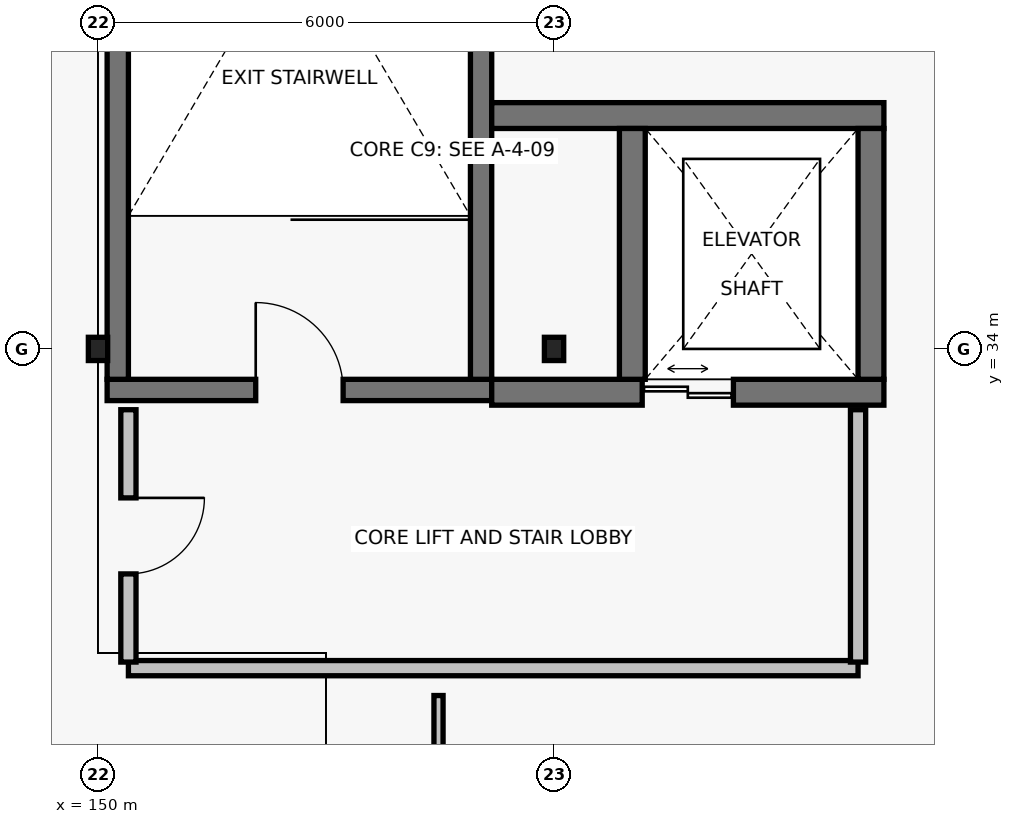
"""IFC4 building model, lengths in metres.
Left out: names, types, materials, properties, quantities, classifications, styles, units other than length and angle.
Written with IfcOpenShell. Run it as: python <this file> out.ifc"""

import sys

from ifc_helpers import new_model, si_unit, direction, frame, frame_2d, origin, origin_2d, place, context, subcontext, project, spatial, rectangle, i_section, extrude, element, fill, save


model = new_model("IFC4")
c1 = context("Model", 3, precision=1e-05, world=origin(), true_north=direction((0.0, 1.0)))
c2 = subcontext(c1, "Body", "Model", "MODEL_VIEW")
j1 = project(units=[si_unit("LENGTHUNIT", "METRE"), si_unit("PLANEANGLEUNIT", "RADIAN")], contexts=[c1])
p1 = place(None, origin())
s1 = spatial("IfcSite", under=j1, at=p1, CompositionType="ELEMENT")
p2 = place(p1, origin())
s2 = spatial("IfcBuilding", under=s1, at=p2, CompositionType="ELEMENT")
p3 = place(p2, frame((0.0, 0.0, 11.4)))
s3 = spatial("IfcBuildingStorey", under=s2, at=p3, CompositionType="ELEMENT", Elevation=11.4)
for number, where, z_axis, x_axis in (
    (1, (150.0, 34.0, 0.0), (0.0, 0.0, 1.0), (1.0, 0.0, 0.0)),
    (2, (156.0, 34.0, 0.0), (0.0, 0.0, 1.0), (1.0, 0.0, 0.0)),
):
    element("IfcColumn", number, at=place(p3, frame(where, z_axis=z_axis, x_axis=x_axis)), inside=s3, PredefinedType="COLUMN", context=c2, shape_type="SweptSolid", body=[
        extrude(i_section(OverallWidth=0.254, OverallDepth=0.306, WebThickness=0.009, FlangeThickness=0.015, FilletRadius=0.013, at=origin_2d()), origin(), (0.0, 0.0, 1.0), 4.0),
    ])
p4 = place(p3, frame((150.12, 33.46, 0.0), z_axis=(0.0, 0.0, 1.0), x_axis=(1.0, 0.0, 0.0)))
e3 = element("IfcWall", 3, at=p4, inside=s3, PredefinedType="SHEAR", context=c2, shape_type="SweptSolid", body=[
    extrude(rectangle(XDim=5.06, YDim=0.28, at=frame_2d((2.53, 0.0))), origin(), (0.0, 0.0, 1.0), 3.76),
])
p5 = place(p4, frame((1.955, 0.0, 0.0)))
e4 = element("IfcOpeningElement", 4, at=p5, cuts=e3, PredefinedType="OPENING", context=c2, shape_type="SweptSolid", body=[
    extrude(rectangle(XDim=1.15, YDim=2.15, at=frame_2d((0.575, 1.075))), frame((0.0, 0.155, 0.0), z_axis=(0.0, -1.0, 0.0), x_axis=(1.0, 0.0, 0.0)), (0.0, 0.0, 1.0), 0.31),
])
for number, where, z_axis, x_axis in (
    (5, (150.26, 43.4, 0.0), (0.0, 0.0, 1.0), (0.0, -1.0, 0.0)),
    (6, (155.04, 33.6, 0.0), (0.0, 0.0, 1.0), (0.0, 1.0, 0.0)),
):
    element("IfcWall", number, at=place(p3, frame(where, z_axis=z_axis, x_axis=x_axis)), inside=s3, PredefinedType="SHEAR", context=c2, shape_type="SweptSolid", body=[
        extrude(rectangle(XDim=9.8, YDim=0.28, at=frame_2d((4.9, 0.0))), origin(), (0.0, 0.0, 1.0), 3.76),
    ])
p6 = place(p3, frame((155.18, 33.43, 0.0), z_axis=(0.0, 0.0, 1.0), x_axis=(1.0, 0.0, 0.0)))
e7 = element("IfcWall", 7, at=p6, inside=s3, PredefinedType="SHEAR", context=c2, shape_type="SweptSolid", body=[
    extrude(rectangle(XDim=5.16, YDim=0.34, at=frame_2d((2.58, 0.0))), origin(), (0.0, 0.0, 1.0), 3.76),
])
p7 = place(p6, frame((1.98, 0.0, 0.0)))
e8 = element("IfcOpeningElement", 8, at=p7, cuts=e7, PredefinedType="OPENING", context=c2, shape_type="SweptSolid", body=[
    extrude(rectangle(XDim=1.2, YDim=2.2, at=frame_2d((0.6, 1.1))), frame((0.0, 0.185, 0.0), z_axis=(0.0, -1.0, 0.0), x_axis=(1.0, 0.0, 0.0)), (0.0, 0.0, 1.0), 0.37),
])
p8 = place(p3, frame((160.34, 37.07, 0.0), z_axis=(0.0, 0.0, 1.0), x_axis=(-1.0, 0.0, 0.0)))
e9 = element("IfcWall", 9, at=p8, inside=s3, PredefinedType="SHEAR", context=c2, shape_type="SweptSolid", body=[
    extrude(rectangle(XDim=5.16, YDim=0.34, at=frame_2d((2.58, 0.0))), origin(), (0.0, 0.0, 1.0), 3.76),
])
for number, where, z_axis, x_axis in (
    (10, (157.03, 36.9, 0.0), (0.0, 0.0, 1.0), (0.0, -1.0, 0.0)),
    (11, (160.17, 33.6, 0.0), (0.0, 0.0, 1.0), (0.0, 1.0, 0.0)),
):
    element("IfcWall", number, at=place(p3, frame(where, z_axis=z_axis, x_axis=x_axis)), inside=s3, PredefinedType="SHEAR", context=c2, shape_type="SweptSolid", body=[
        extrude(rectangle(XDim=3.3, YDim=0.34, at=frame_2d((1.65, 0.0))), origin(), (0.0, 0.0, 1.0), 3.76),
    ])
p9 = place(p3, frame((150.4, 29.8, 0.0), z_axis=(0.0, 0.0, 1.0), x_axis=(1.0, 0.0, 0.0)))
e12 = element("IfcWall", 12, at=p9, inside=s3, PredefinedType="PARTITIONING", context=c2, shape_type="SweptSolid", body=[
    extrude(rectangle(XDim=9.6, YDim=0.2, at=frame_2d((4.8, 0.0))), origin(), (0.0, 0.0, 1.0), 3.187),
])
p10 = place(p3, frame((150.4, 33.2, 0.0), z_axis=(0.0, 0.0, 1.0), x_axis=(0.0, -1.0, 0.0)))
e13 = element("IfcWall", 13, at=p10, inside=s3, PredefinedType="PARTITIONING", context=c2, shape_type="SweptSolid", body=[
    extrude(rectangle(XDim=3.32, YDim=0.2, at=frame_2d((1.66, 0.0))), origin(), (0.0, 0.0, 1.0), 3.296),
])
p11 = place(p10, frame((1.16, 0.0, 0.0)))
e14 = element("IfcOpeningElement", 14, at=p11, cuts=e13, PredefinedType="OPENING", context=c2, shape_type="SweptSolid", body=[
    extrude(rectangle(XDim=1.0, YDim=2.15, at=frame_2d((0.5, 1.075))), frame((0.0, 0.115, 0.0), z_axis=(0.0, -1.0, 0.0), x_axis=(1.0, 0.0, 0.0)), (0.0, 0.0, 1.0), 0.23),
])
p12 = place(p3, frame((160.0, 29.88, 0.0), z_axis=(0.0, 0.0, 1.0), x_axis=(0.0, 1.0, 0.0)))
e15 = element("IfcWall", 15, at=p12, inside=s3, PredefinedType="PARTITIONING", context=c2, shape_type="SweptSolid", body=[
    extrude(rectangle(XDim=3.32, YDim=0.2, at=frame_2d((1.66, 0.0))), origin(), (0.0, 0.0, 1.0), 3.68),
])
p13 = place(p3, frame((154.48, 12.48, 0.0), z_axis=(0.0, 0.0, 1.0), x_axis=(0.0, 1.0, 0.0)))
e16 = element("IfcWall", 16, at=p13, inside=s3, PredefinedType="PARTITIONING", context=c2, shape_type="SweptSolid", body=[
    extrude(rectangle(XDim=16.96, YDim=0.12, at=frame_2d((8.48, 0.0))), origin(), (0.0, 0.0, 1.0), 3.187),
])
p14 = place(p13, frame((7.84, 0.0, 0.0)))
e17 = element("IfcOpeningElement", 17, at=p14, cuts=e16, PredefinedType="OPENING", context=c2, shape_type="SweptSolid", body=[
    extrude(rectangle(XDim=1.28, YDim=2.2, at=frame_2d((0.64, 1.1))), frame((0.0, 0.075, 0.0), z_axis=(0.0, -1.0, 0.0), x_axis=(1.0, 0.0, 0.0)), (0.0, 0.0, 1.0), 0.15),
])
p15 = place(p5, origin())
e18 = element("IfcDoor", 18, at=p15, inside=s3, OperationType="SINGLE_SWING_LEFT", PredefinedType="DOOR", context=c2, shape_type="SweptSolid", body=[
    extrude(rectangle(XDim=1.15, YDim=2.15, at=frame_2d((0.575, 1.075))), frame((0.0, 0.025, 0.0), z_axis=(0.0, -1.0, 0.0), x_axis=(1.0, 0.0, 0.0)), (0.0, 0.0, 1.0), 0.05),
])
fill(e4, e18)
p16 = place(p7, origin())
e19 = element("IfcDoor", 19, at=p16, inside=s3, OperationType="DOUBLE_DOOR_SLIDING", PredefinedType="DOOR", context=c2, shape_type="SweptSolid", body=[
    extrude(rectangle(XDim=1.2, YDim=2.2, at=frame_2d((0.6, 1.1))), frame((0.0, 0.025, 0.0), z_axis=(0.0, -1.0, 0.0), x_axis=(1.0, 0.0, 0.0)), (0.0, 0.0, 1.0), 0.05),
])
fill(e8, e19)
p17 = place(p11, origin())
e20 = element("IfcDoor", 20, at=p17, inside=s3, OperationType="SINGLE_SWING_LEFT", PredefinedType="DOOR", context=c2, shape_type="SweptSolid", body=[
    extrude(rectangle(XDim=1.0, YDim=2.15, at=frame_2d((0.5, 1.075))), frame((0.0, 0.025, 0.0), z_axis=(0.0, -1.0, 0.0), x_axis=(1.0, 0.0, 0.0)), (0.0, 0.0, 1.0), 0.05),
])
fill(e14, e20)
save(model, sys.argv[1])
